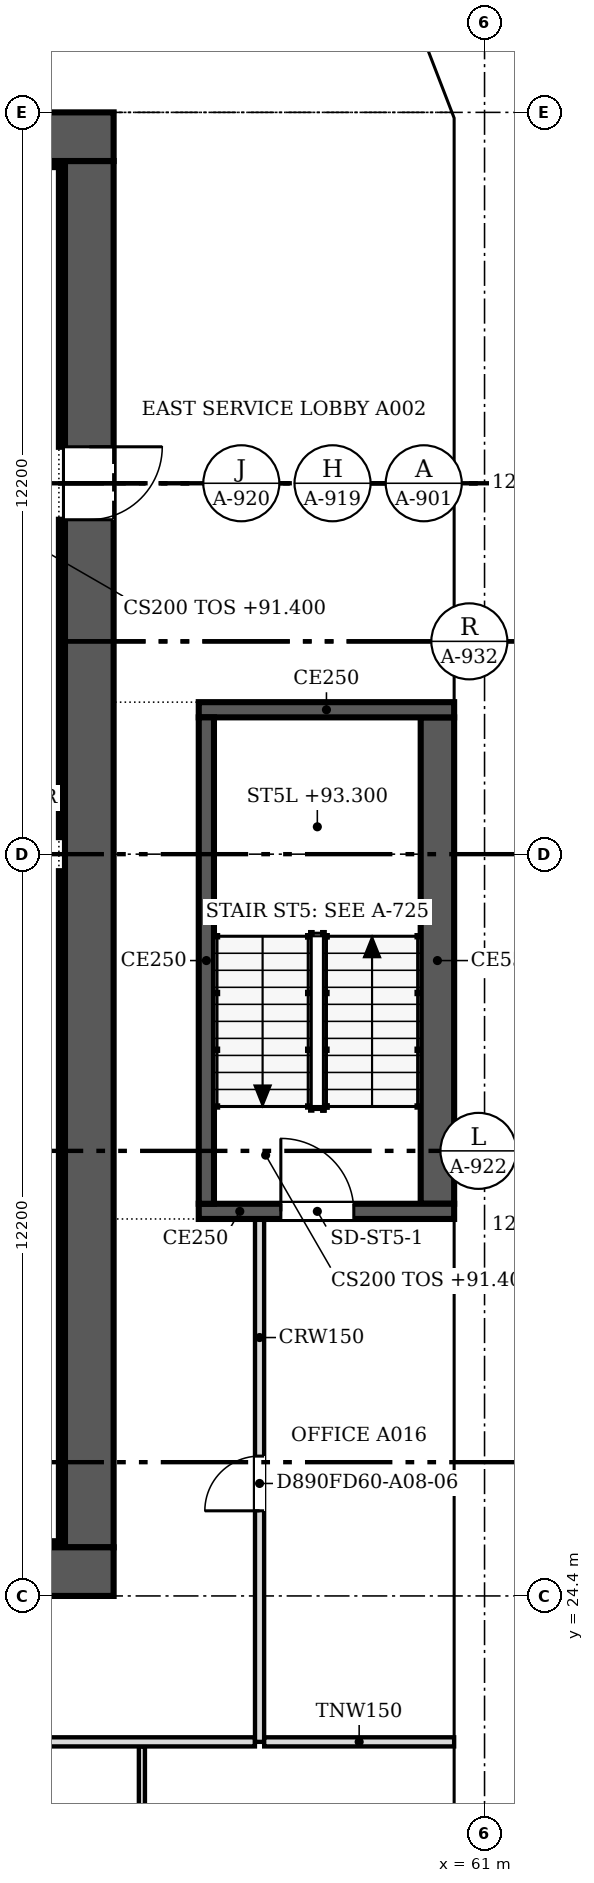
"""IFC4 building model, lengths in metres.
Left out: names, types, materials, properties, quantities, classifications, styles, units other than length and angle.
Written with IfcOpenShell. Run it as: python <this file> out.ifc"""

import sys

from ifc_helpers import new_model, si_unit, direction, frame, frame_2d, origin, place, context, subcontext, project, spatial, polyline, rectangle, outline, extrude, faceted_brep, source, transform, mapped, element, fill, save


model = new_model("IFC4")
c1 = context("Model", 3, precision=1e-05, world=origin(), true_north=direction((0.0, 1.0)))
c2 = subcontext(c1, "Body", "Model", "MODEL_VIEW")
j1 = project(units=[si_unit("LENGTHUNIT", "METRE"), si_unit("PLANEANGLEUNIT", "RADIAN")], contexts=[c1])
p1 = place(None, origin())
s1 = spatial("IfcSite", under=j1, at=p1, CompositionType="ELEMENT")
p2 = place(p1, origin())
s2 = spatial("IfcBuilding", under=s1, at=p2, CompositionType="ELEMENT")
p3 = place(p2, frame((0.0, 0.0, 91.4)))
s3 = spatial("IfcBuildingStorey", under=s2, at=p3, CompositionType="ELEMENT", Elevation=91.4)
m1 = source(origin(), c2, "Body", "Brep", [
    faceted_brep([(3.05, -0.25, 0.0), (6.1, -0.25, 3.8), (6.1, -0.25, 3.8), (3.05, -0.25, 7.6), (0.0, -0.25, 3.8), (0.0, 0.25, 3.8), (3.05, 0.25, 7.6), (6.1, 0.25, 3.8), (6.1, 0.25, 3.8), (3.05, 0.25, 0.0)], [[[0, 1, 2, 3, 4]], [[5, 6, 7, 8, 9]], [[9, 8, 1, 0]], [[7, 6, 3, 2]], [[6, 5, 4, 3]], [[5, 9, 0, 4]], [[1, 8, 7, 2]]]),
])
p4 = place(p3, frame((60.75, 18.3, -3.8), z_axis=(0.0, 0.0, 1.0), x_axis=(0.0, 1.0, 0.0)))
e1 = element("IfcWall", 1, at=p4, inside=s3, PredefinedType="SOLIDWALL", context=c2, shape_type="MappedRepresentation", body=[
    mapped(m1, transform((0.0, 0.0, 0.0), scale=1.0)),
])
m2 = source(origin(), c2, "Body", "SweptSolid", [
    extrude(outline(polyline([(3.05, 0.399), (5.78, 3.8), (3.05, 7.2), (0.321, 3.8), (3.05, 0.399)])), frame((0.0, 0.26, 0.0), z_axis=(0.0, -1.0, 0.0), x_axis=(1.0, 0.0, 0.0)), (0.0, 0.0, 1.0), 0.52),
])
p5 = place(p4, origin())
e2 = element("IfcOpeningElement", 2, at=p5, cuts=e1, PredefinedType="OPENING", context=c2, shape_type="MappedRepresentation", body=[
    mapped(m2, transform((0.0, 0.0, 0.0), scale=1.0)),
])
m3 = source(origin(), c2, "Body", "SweptSolid", [
    extrude(outline(polyline([(3.05, 0.0), (6.1, 3.8), (3.05, 7.6), (0.0, 3.8), (3.05, 0.0)])), frame((0.0, 0.25, 0.0), z_axis=(0.0, -1.0, 0.0), x_axis=(1.0, 0.0, 0.0)), (0.0, 0.0, 1.0), 0.5),
])
p6 = place(p3, frame((60.75, 24.4, -3.8), z_axis=(0.0, 0.0, 1.0), x_axis=(0.0, 1.0, 0.0)))
e3 = element("IfcWall", 3, at=p6, inside=s3, PredefinedType="SOLIDWALL", context=c2, shape_type="MappedRepresentation", body=[
    mapped(m3, transform((0.0, 0.0, 0.0), scale=1.0)),
])
p7 = place(p6, origin())
e4 = element("IfcOpeningElement", 4, at=p7, cuts=e3, PredefinedType="OPENING", context=c2, shape_type="MappedRepresentation", body=[
    mapped(m2, transform((0.0, 0.0, 0.0), scale=1.0)),
])
p8 = place(p3, frame((60.75, 30.5, -3.8), z_axis=(0.0, 0.0, 1.0), x_axis=(0.0, 1.0, 0.0)))
e5 = element("IfcWall", 5, at=p8, inside=s3, PredefinedType="SOLIDWALL", context=c2, shape_type="MappedRepresentation", body=[
    mapped(m3, transform((0.0, 0.0, 0.0), scale=1.0)),
])
p9 = place(p8, origin())
e6 = element("IfcOpeningElement", 6, at=p9, cuts=e5, PredefinedType="OPENING", context=c2, shape_type="MappedRepresentation", body=[
    mapped(m2, transform((0.0, 0.0, 0.0), scale=1.0)),
])
p10 = place(p3, frame((60.75, 36.6, -3.8), z_axis=(0.0, 0.0, 1.0), x_axis=(0.0, 1.0, 0.0)))
e7 = element("IfcWall", 7, at=p10, inside=s3, PredefinedType="SOLIDWALL", context=c2, shape_type="MappedRepresentation", body=[
    mapped(m1, transform((0.0, 0.0, 0.0), scale=1.0)),
])
p11 = place(p10, origin())
e8 = element("IfcOpeningElement", 8, at=p11, cuts=e7, PredefinedType="OPENING", context=c2, shape_type="MappedRepresentation", body=[
    mapped(m2, transform((0.0, 0.0, 0.0), scale=1.0)),
])
m4 = source(origin(), c2, "Body", "Brep", [
    faceted_brep([(3.05, -0.25, 0.0), (6.053, -0.25, 3.8), (3.05, -0.25, 7.6), (0.0, -0.25, 3.8), (0.0, 0.25, 3.8), (3.05, 0.25, 7.6), (6.007, 0.25, 3.859), (6.007, 0.25, 3.741), (3.05, 0.25, 0.0), (6.053, 0.0, 3.8)], [[[0, 1, 2, 3]], [[4, 5, 6, 7, 8]], [[8, 7, 9, 1, 0]], [[6, 5, 2, 1, 9]], [[5, 4, 3, 2]], [[4, 8, 0, 3]], [[9, 7, 6]]]),
])
p12 = place(p3, frame((60.75, 42.7, -3.8), z_axis=(0.0, 0.0, 1.0), x_axis=(0.0, 1.0, 0.0)))
e9 = element("IfcWall", 9, at=p12, inside=s3, PredefinedType="SOLIDWALL", context=c2, shape_type="MappedRepresentation", body=[
    mapped(m4, transform((0.0, 0.0, 0.0), scale=1.0)),
])
m5 = source(origin(), c2, "Body", "SweptSolid", [
    extrude(outline(polyline([(3.049, 0.401), (5.735, 3.8), (3.049, 7.199), (0.321, 3.8), (3.049, 0.401)])), frame((0.0, 0.26, 0.0), z_axis=(0.0, -1.0, 0.0), x_axis=(1.0, 0.0, 0.0)), (0.0, 0.0, 1.0), 0.52),
])
p13 = place(p12, origin())
e10 = element("IfcOpeningElement", 10, at=p13, cuts=e9, PredefinedType="OPENING", context=c2, shape_type="MappedRepresentation", body=[
    mapped(m5, transform((0.0, 0.0, 0.0), scale=1.0)),
])
m6 = source(origin(), c2, "Body", "Brep", [
    faceted_brep([(2.95, -0.25, 0.0), (3.003, -0.25, 0.068), (3.003, -0.25, 7.531), (2.95, -0.25, 7.6), (0.0, -0.25, 3.8), (0.047, 0.25, 3.86), (2.898, 0.25, 7.532), (2.898, 0.25, 0.068), (0.047, 0.25, 3.74), (2.95, 0.0, 0.0), (2.95, 0.0, 7.6), (0.0, 0.0, 3.8)], [[[0, 1, 2, 3, 4]], [[5, 6, 7, 8]], [[1, 0, 9]], [[10, 3, 2]], [[6, 5, 11, 4, 3, 10]], [[8, 7, 9, 0, 4, 11]], [[8, 11, 5]], [[1, 9, 7, 6, 10, 2]]]),
])
p14 = place(p3, frame((60.75, 48.753, -3.8), z_axis=(0.0, 0.0, 1.0), x_axis=(-0.35992665181, 0.932980602862, 0.0)))
e11 = element("IfcWall", 11, at=p14, inside=s3, PredefinedType="SOLIDWALL", context=c2, shape_type="MappedRepresentation", body=[
    mapped(m6, transform((0.0, 0.0, 0.0), scale=1.0)),
])
m7 = source(origin(), c2, "Body", "SweptSolid", [
    extrude(outline(polyline([(2.75, 6.935), (0.316, 3.8), (2.75, 0.665), (2.75, 6.935)])), frame((0.0, 0.26, 0.0), z_axis=(0.0, -1.0, 0.0), x_axis=(1.0, 0.0, 0.0)), (0.0, 0.0, 1.0), 0.52),
])
p15 = place(p14, origin())
e12 = element("IfcOpeningElement", 12, at=p15, cuts=e11, PredefinedType="OPENING", context=c2, shape_type="MappedRepresentation", body=[
    mapped(m7, transform((0.0, 0.0, 0.0), scale=1.0)),
])
p16 = place(p2, frame((0.0, 0.0, 95.2)))
s4 = spatial("IfcBuildingStorey", under=s2, at=p16, CompositionType="ELEMENT", Elevation=95.2)
m8 = source(origin(), c2, "Body", "SweptSolid", [
    extrude(outline(polyline([(3.05, 0.0), (6.1, 3.8), (3.05, 7.6), (0.0, 3.8), (3.05, 0.0)])), frame((0.0, 0.25, 0.0), z_axis=(0.0, -1.0, 0.0), x_axis=(1.0, 0.0, 0.0)), (0.0, 0.0, 1.0), 0.5),
])
p17 = place(p16, frame((60.75, 15.25, -3.8), z_axis=(0.0, 0.0, 1.0), x_axis=(0.0, 1.0, 0.0)))
e13 = element("IfcWall", 13, at=p17, inside=s4, PredefinedType="SOLIDWALL", context=c2, shape_type="MappedRepresentation", body=[
    mapped(m8, transform((0.0, 0.0, 0.0), scale=1.0)),
])
m9 = source(origin(), c2, "Body", "SweptSolid", [
    extrude(outline(polyline([(3.05, 0.399), (5.78, 3.8), (3.05, 7.201), (0.321, 3.8), (3.05, 0.399)])), frame((0.0, 0.26, 0.0), z_axis=(0.0, -1.0, 0.0), x_axis=(1.0, 0.0, 0.0)), (0.0, 0.0, 1.0), 0.52),
])
p18 = place(p17, origin())
e14 = element("IfcOpeningElement", 14, at=p18, cuts=e13, PredefinedType="OPENING", context=c2, shape_type="MappedRepresentation", body=[
    mapped(m9, transform((0.0, 0.0, 0.0), scale=1.0)),
])
m10 = source(origin(), c2, "Body", "Brep", [
    faceted_brep([(3.05, -0.25, 0.0), (6.1, -0.25, 3.8), (6.1, -0.25, 3.8), (3.05, -0.25, 7.6), (0.0, -0.25, 3.8), (0.0, 0.25, 3.8), (3.05, 0.25, 7.6), (6.1, 0.25, 3.8), (6.1, 0.25, 3.8), (3.05, 0.25, 0.0)], [[[0, 1, 2, 3, 4]], [[5, 6, 7, 8, 9]], [[9, 8, 1, 0]], [[7, 6, 3, 2]], [[6, 5, 4, 3]], [[5, 9, 0, 4]], [[1, 8, 7, 2]]]),
])
p19 = place(p16, frame((60.75, 21.35, -3.8), z_axis=(0.0, 0.0, 1.0), x_axis=(0.0, 1.0, 0.0)))
e15 = element("IfcWall", 15, at=p19, inside=s4, PredefinedType="SOLIDWALL", context=c2, shape_type="MappedRepresentation", body=[
    mapped(m10, transform((0.0, 0.0, 0.0), scale=1.0)),
])
p20 = place(p19, origin())
e16 = element("IfcOpeningElement", 16, at=p20, cuts=e15, PredefinedType="OPENING", context=c2, shape_type="MappedRepresentation", body=[
    mapped(m9, transform((0.0, 0.0, 0.0), scale=1.0)),
])
p21 = place(p16, frame((60.75, 27.45, -3.8), z_axis=(0.0, 0.0, 1.0), x_axis=(0.0, 1.0, 0.0)))
e17 = element("IfcWall", 17, at=p21, inside=s4, PredefinedType="SOLIDWALL", context=c2, shape_type="MappedRepresentation", body=[
    mapped(m8, transform((0.0, 0.0, 0.0), scale=1.0)),
])
p22 = place(p21, origin())
e18 = element("IfcOpeningElement", 18, at=p22, cuts=e17, PredefinedType="OPENING", context=c2, shape_type="MappedRepresentation", body=[
    mapped(m9, transform((0.0, 0.0, 0.0), scale=1.0)),
])
p23 = place(p16, frame((60.75, 33.55, -3.8), z_axis=(0.0, 0.0, 1.0), x_axis=(0.0, 1.0, 0.0)))
e19 = element("IfcWall", 19, at=p23, inside=s4, PredefinedType="SOLIDWALL", context=c2, shape_type="MappedRepresentation", body=[
    mapped(m10, transform((0.0, 0.0, 0.0), scale=1.0)),
])
p24 = place(p23, origin())
e20 = element("IfcOpeningElement", 20, at=p24, cuts=e19, PredefinedType="OPENING", context=c2, shape_type="MappedRepresentation", body=[
    mapped(m9, transform((0.0, 0.0, 0.0), scale=1.0)),
])
p25 = place(p16, frame((60.75, 39.65, -3.8), z_axis=(0.0, 0.0, 1.0), x_axis=(0.0, 1.0, 0.0)))
e21 = element("IfcWall", 21, at=p25, inside=s4, PredefinedType="SOLIDWALL", context=c2, shape_type="MappedRepresentation", body=[
    mapped(m8, transform((0.0, 0.0, 0.0), scale=1.0)),
])
p26 = place(p25, origin())
e22 = element("IfcOpeningElement", 22, at=p26, cuts=e21, PredefinedType="OPENING", context=c2, shape_type="MappedRepresentation", body=[
    mapped(m9, transform((0.0, 0.0, 0.0), scale=1.0)),
])
m11 = source(origin(), c2, "Body", "Brep", [
    faceted_brep([(3.003, -0.25, 0.0), (3.05, -0.25, 0.06), (3.05, -0.25, 7.54), (3.003, -0.25, 7.6), (0.0, -0.25, 3.8), (0.0, 0.25, 3.8), (2.957, 0.25, 7.541), (2.957, 0.25, 0.059), (3.003, 0.0, 0.0), (3.003, 0.0, 7.6)], [[[0, 1, 2, 3, 4]], [[5, 6, 7]], [[1, 0, 8]], [[9, 3, 2]], [[6, 5, 4, 3, 9]], [[5, 7, 8, 0, 4]], [[1, 8, 7, 6, 9, 2]]]),
])
p27 = place(p16, frame((60.75, 45.75, -3.8), z_axis=(0.0, 0.0, 1.0), x_axis=(0.0, 1.0, 0.0)))
e23 = element("IfcWall", 23, at=p27, inside=s4, PredefinedType="SOLIDWALL", context=c2, shape_type="MappedRepresentation", body=[
    mapped(m11, transform((0.0, 0.0, 0.0), scale=1.0)),
])
m12 = source(origin(), c2, "Body", "SweptSolid", [
    extrude(outline(polyline([(2.803, 6.944), (0.319, 3.8), (2.803, 0.656), (2.803, 6.944)])), frame((0.0, 0.26, 0.0), z_axis=(0.0, -1.0, 0.0), x_axis=(1.0, 0.0, 0.0)), (0.0, 0.0, 1.0), 0.52),
])
p28 = place(p27, origin())
e24 = element("IfcOpeningElement", 24, at=p28, cuts=e23, PredefinedType="OPENING", context=c2, shape_type="MappedRepresentation", body=[
    mapped(m12, transform((0.0, 0.0, 0.0), scale=1.0)),
])
m13 = source(origin(), c2, "Body", "Brep", [
    faceted_brep([(0.047, -0.25, 0.0), (2.997, -0.25, 3.8), (0.047, -0.25, 7.6), (0.0, -0.25, 7.541), (0.0, -0.25, 0.059), (0.093, 0.25, 7.54), (2.944, 0.25, 3.868), (2.944, 0.25, 3.732), (0.093, 0.25, 0.06), (2.997, 0.0, 3.8), (0.047, 0.0, 0.0), (0.047, 0.0, 7.6)], [[[0, 1, 2, 3, 4]], [[5, 6, 7, 8]], [[8, 7, 9, 1, 0, 10]], [[6, 5, 11, 2, 1, 9]], [[3, 2, 11]], [[10, 0, 4]], [[8, 10, 4, 3, 11, 5]], [[9, 7, 6]]]),
])
p29 = place(p16, frame((60.767, 48.71, -3.8), z_axis=(0.0, 0.0, 1.0), x_axis=(-0.359901446078, 0.932990326376, 0.0)))
e25 = element("IfcWall", 25, at=p29, inside=s4, PredefinedType="SOLIDWALL", context=c2, shape_type="MappedRepresentation", body=[
    mapped(m13, transform((0.0, 0.0, 0.0), scale=1.0)),
])
m14 = source(origin(), c2, "Body", "SweptSolid", [
    extrude(outline(polyline([(0.247, 0.665), (2.681, 3.8), (0.247, 6.935), (0.247, 0.665)])), frame((0.0, 0.26, 0.0), z_axis=(0.0, -1.0, 0.0), x_axis=(1.0, 0.0, 0.0)), (0.0, 0.0, 1.0), 0.52),
])
p30 = place(p29, origin())
e26 = element("IfcOpeningElement", 26, at=p30, cuts=e25, PredefinedType="OPENING", context=c2, shape_type="MappedRepresentation", body=[
    mapped(m14, transform((0.0, 0.0, 0.0), scale=1.0)),
])
p31 = place(p3, frame((54.9, 24.8, 0.0), z_axis=(0.0, 0.0, 1.0), x_axis=(-1.0, 0.0, 0.0)))
e27 = element("IfcWall", 27, at=p31, inside=s3, PredefinedType="SHEAR", context=c2, shape_type="SweptSolid", body=[
    extrude(rectangle(XDim=24.4, YDim=0.8, at=frame_2d((12.2, 0.0))), origin(), (0.0, 0.0, 1.0), 3.8),
])
m15 = source(origin(), c2, "Body", "SweptSolid", [
    extrude(rectangle(XDim=1.2, YDim=2.1, at=frame_2d((0.6, 1.05))), frame((0.0, 0.41, 0.0), z_axis=(0.0, -1.0, 0.0), x_axis=(1.0, 0.0, 0.0)), (0.0, 0.0, 1.0), 0.82),
])
p32 = place(p31, frame((1.5, 0.0, 0.0)))
e28 = element("IfcOpeningElement", 28, at=p32, cuts=e27, PredefinedType="OPENING", context=c2, shape_type="MappedRepresentation", body=[
    mapped(m15, transform((0.0, 0.0, 0.0), scale=1.0)),
])
p33 = place(p3, frame((30.5, 48.4, 0.0), z_axis=(0.0, 0.0, 1.0), x_axis=(1.0, 0.0, 0.0)))
e29 = element("IfcWall", 29, at=p33, inside=s3, PredefinedType="SHEAR", context=c2, shape_type="SweptSolid", body=[
    extrude(rectangle(XDim=24.4, YDim=0.8, at=frame_2d((12.2, 0.0))), origin(), (0.0, 0.0, 1.0), 3.8),
])
p34 = place(p3, frame((54.5, 48.0, 0.0), z_axis=(0.0, 0.0, 1.0), x_axis=(0.0, -1.0, 0.0)))
e30 = element("IfcWall", 30, at=p34, inside=s3, PredefinedType="SHEAR", context=c2, shape_type="SweptSolid", body=[
    extrude(rectangle(XDim=22.8, YDim=0.8, at=frame_2d((11.4, 0.0))), origin(), (0.0, 0.0, 1.0), 3.8),
])
p35 = place(p34, frame((4.7, 0.0, 0.0)))
e31 = element("IfcOpeningElement", 31, at=p35, cuts=e30, PredefinedType="OPENING", context=c2, shape_type="MappedRepresentation", body=[
    mapped(m15, transform((0.0, 0.0, 0.0), scale=1.0)),
])
p36 = place(p3, frame((53.4, 25.25, 0.0), z_axis=(0.0, 0.0, 1.0), x_axis=(1.0, 0.0, 0.0)))
e32 = element("IfcWall", 32, at=p36, inside=s3, PredefinedType="SOLIDWALL", context=c2, shape_type="SweptSolid", body=[
    extrude(rectangle(XDim=0.7, YDim=0.1, at=frame_2d((0.35, 0.0))), origin(), (0.0, 0.0, 1.0), 3.8),
])
p37 = place(p3, frame((31.3, 47.95, 0.0), z_axis=(0.0, 0.0, 1.0), x_axis=(1.0, 0.0, 0.0)))
e33 = element("IfcWall", 33, at=p37, inside=s3, PredefinedType="SOLIDWALL", context=c2, shape_type="SweptSolid", body=[
    extrude(rectangle(XDim=22.8, YDim=0.1, at=frame_2d((11.4, 0.0))), origin(), (0.0, 0.0, 1.0), 3.8),
])
p38 = place(p3, frame((54.05, 25.3, 0.0), z_axis=(0.0, 0.0, 1.0), x_axis=(0.0, 1.0, 0.0)))
e34 = element("IfcWall", 34, at=p38, inside=s3, PredefinedType="SOLIDWALL", context=c2, shape_type="SweptSolid", body=[
    extrude(rectangle(XDim=11.02, YDim=0.1, at=frame_2d((5.51, 0.0))), origin(), (0.0, 0.0, 1.0), 3.8),
])
p39 = place(p3, frame((54.05, 36.88, 0.0), z_axis=(0.0, 0.0, 1.0), x_axis=(0.0, 1.0, 0.0)))
e35 = element("IfcWall", 35, at=p39, inside=s3, PredefinedType="SOLIDWALL", context=c2, shape_type="SweptSolid", body=[
    extrude(rectangle(XDim=5.22, YDim=0.1, at=frame_2d((2.61, 0.0))), origin(), (0.0, 0.0, 1.0), 3.8),
])
p40 = place(p3, frame((54.05, 43.3, 0.0), z_axis=(0.0, 0.0, 1.0), x_axis=(0.0, 1.0, 0.0)))
e36 = element("IfcWall", 36, at=p40, inside=s3, PredefinedType="SOLIDWALL", context=c2, shape_type="SweptSolid", body=[
    extrude(rectangle(XDim=4.6, YDim=0.1, at=frame_2d((2.3, 0.0))), origin(), (0.0, 0.0, 1.0), 3.8),
])
p41 = place(p3, frame((60.5, 30.725, 0.0), z_axis=(0.0, 0.0, 1.0), x_axis=(-1.0, 0.0, 0.0)))
e37 = element("IfcWall", 37, at=p41, inside=s3, PredefinedType="SOLIDWALL", context=c2, shape_type="SweptSolid", body=[
    extrude(rectangle(XDim=4.2, YDim=0.25, at=frame_2d((2.1, 0.0))), origin(), (0.0, 0.0, 1.0), 3.8),
])
m16 = source(origin(), c2, "Body", "SweptSolid", [
    extrude(rectangle(XDim=1.2, YDim=2.1, at=frame_2d((0.6, 1.05))), frame((0.0, 0.135, 0.0), z_axis=(0.0, -1.0, 0.0), x_axis=(1.0, 0.0, 0.0)), (0.0, 0.0, 1.0), 0.27),
])
p42 = place(p41, frame((1.65, 0.0, 0.0)))
e38 = element("IfcOpeningElement", 38, at=p42, cuts=e37, PredefinedType="OPENING", context=c2, shape_type="MappedRepresentation", body=[
    mapped(m16, transform((0.0, 0.0, 0.0), scale=1.0)),
])
p43 = place(p3, frame((56.425, 30.85, 0.0), z_axis=(0.0, 0.0, 1.0), x_axis=(0.0, 1.0, 0.0)))
e39 = element("IfcWall", 39, at=p43, inside=s3, PredefinedType="SOLIDWALL", context=c2, shape_type="SweptSolid", body=[
    extrude(rectangle(XDim=8.0, YDim=0.25, at=frame_2d((4.0, 0.0))), origin(), (0.0, 0.0, 1.0), 3.8),
])
p44 = place(p3, frame((56.3, 38.975, 0.0), z_axis=(0.0, 0.0, 1.0), x_axis=(1.0, 0.0, 0.0)))
e40 = element("IfcWall", 40, at=p44, inside=s3, PredefinedType="SOLIDWALL", context=c2, shape_type="SweptSolid", body=[
    extrude(rectangle(XDim=4.2, YDim=0.25, at=frame_2d((2.1, 0.0))), origin(), (0.0, 0.0, 1.0), 3.8),
])
p45 = place(p3, frame((60.225, 38.85, 0.0), z_axis=(0.0, 0.0, 1.0), x_axis=(0.0, -1.0, 0.0)))
e41 = element("IfcWall", 41, at=p45, inside=s3, PredefinedType="SOLIDWALL", context=c2, shape_type="SweptSolid", body=[
    extrude(rectangle(XDim=8.0, YDim=0.55, at=frame_2d((4.0, 0.0))), origin(), (0.0, 0.0, 1.0), 3.8),
])
p46 = place(p3, frame((55.365, 21.924, 0.0), z_axis=(0.0, 0.0, 1.0), x_axis=(0.0, -1.0, 0.0)))
e42 = element("IfcWall", 42, at=p46, inside=s3, PredefinedType="PARTITIONING", context=c2, shape_type="SweptSolid", body=[
    extrude(rectangle(XDim=7.748, YDim=0.1, at=frame_2d((3.874, 0.0))), origin(), (0.0, 0.0, 1.0), 2.895),
])
m17 = source(origin(), c2, "Body", "SweptSolid", [
    extrude(rectangle(XDim=0.9, YDim=2.1, at=frame_2d((0.45, 1.05))), frame((0.0, 0.06, 0.0), z_axis=(0.0, -1.0, 0.0), x_axis=(1.0, 0.0, 0.0)), (0.0, 0.0, 1.0), 0.12),
])
p47 = place(p46, frame((3.448, 0.0, 0.0)))
e43 = element("IfcOpeningElement", 43, at=p47, cuts=e42, PredefinedType="OPENING", context=c2, shape_type="MappedRepresentation", body=[
    mapped(m17, transform((0.0, 0.0, 0.0), scale=1.0)),
])
p48 = place(p3, frame((45.4, 22.0, 0.0), z_axis=(0.0, 0.0, 1.0), x_axis=(1.0, 0.0, 0.0)))
e44 = element("IfcWall", 44, at=p48, inside=s3, PredefinedType="PARTITIONING", context=c2, shape_type="SweptSolid", body=[
    extrude(rectangle(XDim=11.824, YDim=0.15, at=frame_2d((5.912, 0.0))), origin(), (0.0, 0.0, 1.0), 2.895),
])
p49 = place(p3, frame((57.3, 30.6, 0.0), z_axis=(0.0, 0.0, 1.0), x_axis=(0.0, -1.0, 0.0)))
e45 = element("IfcWall", 45, at=p49, inside=s3, PredefinedType="PARTITIONING", context=c2, shape_type="SweptSolid", body=[
    extrude(rectangle(XDim=8.6, YDim=0.15, at=frame_2d((4.3, 0.0))), origin(), (0.0, 0.0, 1.0), 2.895),
])
m18 = source(origin(), c2, "Body", "SweptSolid", [
    extrude(rectangle(XDim=0.9, YDim=2.1, at=frame_2d((0.45, 1.05))), frame((0.0, 0.085, 0.0), z_axis=(0.0, -1.0, 0.0), x_axis=(1.0, 0.0, 0.0)), (0.0, 0.0, 1.0), 0.17),
])
p50 = place(p49, frame((3.9, 0.0, 0.0)))
e46 = element("IfcOpeningElement", 46, at=p50, cuts=e45, PredefinedType="OPENING", context=c2, shape_type="MappedRepresentation", body=[
    mapped(m18, transform((0.0, 0.0, 0.0), scale=1.0)),
])
p51 = place(p3, frame((57.376, 22.0, 0.0), z_axis=(0.0, 0.0, 1.0), x_axis=(1.0, 0.0, 0.0)))
e47 = element("IfcWall", 47, at=p51, inside=s3, PredefinedType="PARTITIONING", context=c2, shape_type="SweptSolid", body=[
    extrude(rectangle(XDim=3.124, YDim=0.15, at=frame_2d((1.562, 0.0))), origin(), (0.0, 0.0, 1.0), 2.895),
])
m19 = source(origin(), c2, "Body", "SweptSolid", [
    extrude(rectangle(XDim=1.2, YDim=2.1, at=frame_2d((0.6, 1.05))), frame((0.0, 0.025, 0.0), z_axis=(0.0, -1.0, 0.0), x_axis=(1.0, 0.0, 0.0)), (0.0, 0.0, 1.0), 0.05),
])
p52 = place(p35, origin())
e48 = element("IfcDoor", 48, at=p52, inside=s3, OperationType="SINGLE_SWING_LEFT", PredefinedType="DOOR", context=c2, shape_type="MappedRepresentation", body=[
    mapped(m19, transform((0.0, 0.0, 0.0), scale=1.0)),
])
fill(e31, e48)
p53 = place(p42, origin())
e49 = element("IfcDoor", 49, at=p53, inside=s3, OperationType="SINGLE_SWING_RIGHT", PredefinedType="DOOR", context=c2, shape_type="MappedRepresentation", body=[
    mapped(m19, transform((0.0, 0.0, 0.0), scale=1.0)),
])
fill(e38, e49)
m20 = source(origin(), c2, "Body", "SweptSolid", [
    extrude(rectangle(XDim=0.9, YDim=2.1, at=frame_2d((0.45, 1.05))), frame((0.0, 0.025, 0.0), z_axis=(0.0, -1.0, 0.0), x_axis=(1.0, 0.0, 0.0)), (0.0, 0.0, 1.0), 0.05),
])
p54 = place(p50, origin())
e50 = element("IfcDoor", 50, at=p54, inside=s3, OperationType="SINGLE_SWING_RIGHT", PredefinedType="DOOR", context=c2, shape_type="MappedRepresentation", body=[
    mapped(m20, transform((0.0, 0.0, 0.0), scale=1.0)),
])
fill(e46, e50)
save(model, sys.argv[1])
